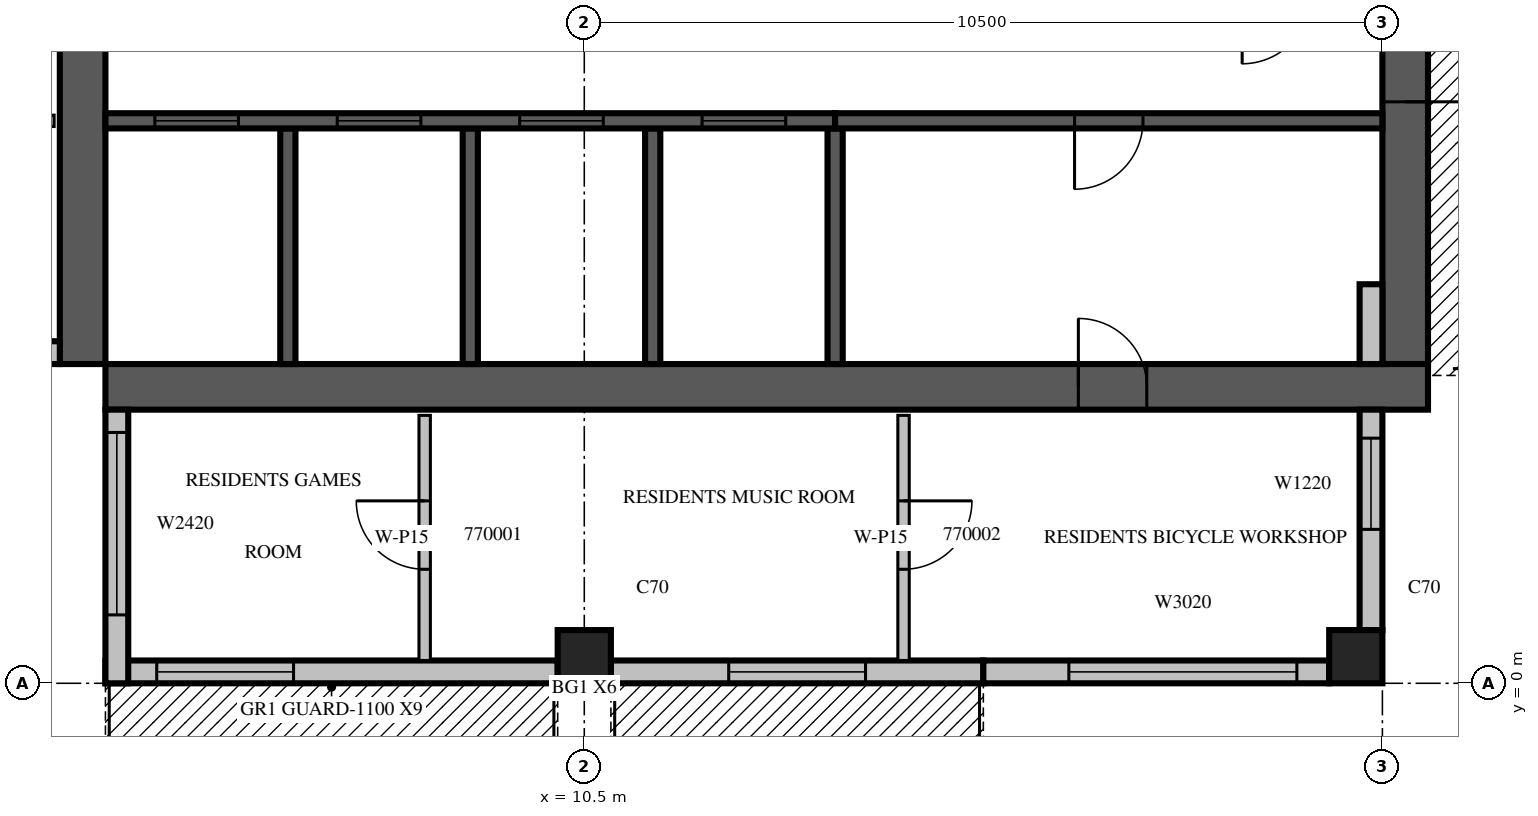
"""IFC4 building model, lengths in metres.
Left out: names, types, materials, properties, quantities, classifications, styles, units other than length and angle.
Written with IfcOpenShell. Run it as: python <this file> out.ifc"""

import sys

from ifc_helpers import new_model, si_unit, direction, frame, frame_2d, origin, origin_2d, place, context, subcontext, project, spatial, rectangle, extrude, source, transform, mapped, element, fill, save


model = new_model("IFC4")
c1 = context("Model", 3, precision=1e-05, world=origin(), true_north=direction((0.0, 1.0)))
c2 = subcontext(c1, "Body", "Model", "MODEL_VIEW")
j1 = project(units=[si_unit("LENGTHUNIT", "METRE"), si_unit("PLANEANGLEUNIT", "RADIAN")], contexts=[c1])
p1 = place(None, origin())
s1 = spatial("IfcSite", under=j1, at=p1, CompositionType="ELEMENT")
p2 = place(p1, origin())
s2 = spatial("IfcBuilding", under=s1, at=p2, CompositionType="ELEMENT")
p3 = place(p2, frame((0.0, 0.0, 305.5)))
s3 = spatial("IfcBuildingStorey", under=s2, at=p3, CompositionType="ELEMENT", Elevation=305.5)
m1 = source(origin(), c2, "Body", "SweptSolid", [
    extrude(rectangle(XDim=0.7, YDim=0.7, at=origin_2d()), origin(), (0.0, 0.0, 1.0), 3.5),
])
for number, where, z_axis, x_axis in (
    (1, (10.5, 0.35, 0.0), (0.0, 0.0, 1.0), (1.0, 0.0, 0.0)),
    (2, (20.65, 0.35, 0.0), (0.0, 0.0, 1.0), (1.0, 0.0, 0.0)),
):
    element("IfcColumn", number, at=place(p3, frame(where, z_axis=z_axis, x_axis=x_axis)), inside=s3, PredefinedType="COLUMN", context=c2, shape_type="MappedRepresentation", body=[
        mapped(m1, transform((0.0, 0.0, 0.0), scale=1.0)),
    ])
m2 = source(origin(), c2, "Body", "SweptSolid", [
    extrude(rectangle(XDim=17.4, YDim=0.6, at=frame_2d((8.7, 0.0))), origin(), (0.0, 0.0, 1.0), 3.5),
])
p4 = place(p3, frame((3.9, 4.2, 0.0), z_axis=(0.0, 0.0, 1.0), x_axis=(0.0, 1.0, 0.0)))
e3 = element("IfcWall", 3, at=p4, inside=s3, PredefinedType="SHEAR", context=c2, shape_type="MappedRepresentation", body=[
    mapped(m2, transform((0.0, 0.0, 0.0), scale=1.0)),
])
m3 = source(origin(), c2, "Body", "SweptSolid", [
    extrude(rectangle(XDim=2.2, YDim=2.1, at=frame_2d((1.1, 1.05))), frame((0.0, 0.31, 0.0), z_axis=(0.0, -1.0, 0.0), x_axis=(1.0, 0.0, 0.0)), (0.0, 0.0, 1.0), 0.62),
])
p5 = place(p4, frame((4.2, 0.0, 0.0)))
e4 = element("IfcOpeningElement", 4, at=p5, cuts=e3, PredefinedType="OPENING", context=c2, shape_type="MappedRepresentation", body=[
    mapped(m3, transform((0.0, 0.0, 0.0), scale=1.0)),
])
m4 = source(origin(), c2, "Body", "SweptSolid", [
    extrude(rectangle(XDim=0.9, YDim=2.1, at=frame_2d((0.45, 1.05))), frame((0.0, 0.31, 0.0), z_axis=(0.0, -1.0, 0.0), x_axis=(1.0, 0.0, 0.0)), (0.0, 0.0, 1.0), 0.62),
])
p6 = place(p4, frame((10.95, 0.0, 0.0)))
e5 = element("IfcOpeningElement", 5, at=p6, cuts=e3, PredefinedType="OPENING", context=c2, shape_type="MappedRepresentation", body=[
    mapped(m4, transform((0.0, 0.0, 0.0), scale=1.0)),
])
m5 = source(origin(), c2, "Body", "SweptSolid", [
    extrude(rectangle(XDim=6.3, YDim=0.6, at=frame_2d((3.15, 0.0))), origin(), (0.0, 0.0, 1.0), 3.5),
])
p7 = place(p3, frame((21.3, 4.2, 0.0), z_axis=(0.0, 0.0, 1.0), x_axis=(0.0, 1.0, 0.0)))
e6 = element("IfcWall", 6, at=p7, inside=s3, PredefinedType="SHEAR", context=c2, shape_type="MappedRepresentation", body=[
    mapped(m5, transform((0.0, 0.0, 0.0), scale=1.0)),
])
m6 = source(origin(), c2, "Body", "SweptSolid", [
    extrude(rectangle(XDim=1.2, YDim=2.1, at=frame_2d((0.6, 1.05))), frame((0.0, 0.31, 0.0), z_axis=(0.0, -1.0, 0.0), x_axis=(1.0, 0.0, 0.0)), (0.0, 0.0, 1.0), 0.62),
])
p8 = place(p7, frame((3.45, 0.0, 0.0)))
e7 = element("IfcOpeningElement", 7, at=p8, cuts=e6, PredefinedType="OPENING", context=c2, shape_type="MappedRepresentation", body=[
    mapped(m6, transform((0.0, 0.0, 0.0), scale=1.0)),
])
p9 = place(p3, frame((4.2, 3.9, 0.0), z_axis=(0.0, 0.0, 1.0), x_axis=(1.0, 0.0, 0.0)))
e8 = element("IfcWall", 8, at=p9, inside=s3, PredefinedType="SHEAR", context=c2, shape_type="MappedRepresentation", body=[
    mapped(m2, transform((0.0, 0.0, 0.0), scale=1.0)),
])
p10 = place(p9, frame((12.8, 0.0, 0.0)))
e9 = element("IfcOpeningElement", 9, at=p10, cuts=e8, PredefinedType="OPENING", context=c2, shape_type="MappedRepresentation", body=[
    mapped(m4, transform((0.0, 0.0, 0.0), scale=1.0)),
])
m7 = source(origin(), c2, "Body", "SweptSolid", [
    extrude(rectangle(XDim=5.95, YDim=0.3, at=frame_2d((2.975, 0.0))), origin(), (0.0, 0.0, 1.0), 3.1),
])
p11 = place(p3, frame((4.2, 0.15, 0.0), z_axis=(0.0, 0.0, 1.0), x_axis=(1.0, 0.0, 0.0)))
e10 = element("IfcWall", 10, at=p11, inside=s3, PredefinedType="STANDARD", context=c2, shape_type="MappedRepresentation", body=[
    mapped(m7, transform((0.0, 0.0, 0.0), scale=1.0)),
])
m8 = source(origin(), c2, "Body", "SweptSolid", [
    extrude(rectangle(XDim=1.8, YDim=2.4, at=frame_2d((0.9, 1.2))), frame((0.0, 0.16, 0.0), z_axis=(0.0, -1.0, 0.0), x_axis=(1.0, 0.0, 0.0)), (0.0, 0.0, 1.0), 0.32),
])
p12 = place(p11, frame((0.675, 0.0, 0.0)))
e11 = element("IfcOpeningElement", 11, at=p12, cuts=e10, PredefinedType="OPENING", context=c2, shape_type="MappedRepresentation", body=[
    mapped(m8, transform((0.0, 0.0, 0.0), scale=1.0)),
])
m9 = source(origin(), c2, "Body", "SweptSolid", [
    extrude(rectangle(XDim=4.9, YDim=0.3, at=frame_2d((2.45, 0.0))), origin(), (0.0, 0.0, 1.0), 3.1),
])
p13 = place(p3, frame((10.85, 0.15, 0.0), z_axis=(0.0, 0.0, 1.0), x_axis=(1.0, 0.0, 0.0)))
e12 = element("IfcWall", 12, at=p13, inside=s3, PredefinedType="STANDARD", context=c2, shape_type="MappedRepresentation", body=[
    mapped(m9, transform((0.0, 0.0, 0.0), scale=1.0)),
])
p14 = place(p13, frame((1.55, 0.0, 0.0)))
e13 = element("IfcOpeningElement", 13, at=p14, cuts=e12, PredefinedType="OPENING", context=c2, shape_type="MappedRepresentation", body=[
    mapped(m8, transform((0.0, 0.0, 0.0), scale=1.0)),
])
m10 = source(origin(), c2, "Body", "SweptSolid", [
    extrude(rectangle(XDim=4.55, YDim=0.3, at=frame_2d((2.275, 0.0))), origin(), (0.0, 0.0, 1.0), 3.1),
])
p15 = place(p3, frame((15.75, 0.15, 0.0), z_axis=(0.0, 0.0, 1.0), x_axis=(1.0, 0.0, 0.0)))
e14 = element("IfcWall", 14, at=p15, inside=s3, PredefinedType="STANDARD", context=c2, shape_type="MappedRepresentation", body=[
    mapped(m10, transform((0.0, 0.0, 0.0), scale=1.0)),
])
m11 = source(origin(), c2, "Body", "SweptSolid", [
    extrude(rectangle(XDim=3.0, YDim=2.0, at=frame_2d((1.5, 1.0))), frame((0.0, 0.16, 0.0), z_axis=(0.0, -1.0, 0.0), x_axis=(1.0, 0.0, 0.0)), (0.0, 0.0, 1.0), 0.32),
])
p16 = place(p15, frame((1.125, 0.0, 0.6)))
e15 = element("IfcOpeningElement", 15, at=p16, cuts=e14, PredefinedType="OPENING", context=c2, shape_type="MappedRepresentation", body=[
    mapped(m11, transform((0.0, 0.0, 0.0), scale=1.0)),
])
m12 = source(origin(), c2, "Body", "SweptSolid", [
    extrude(rectangle(XDim=2.9, YDim=0.3, at=frame_2d((1.45, 0.0))), origin(), (0.0, 0.0, 1.0), 3.1),
])
p17 = place(p3, frame((20.85, 0.7, 0.0), z_axis=(0.0, 0.0, 1.0), x_axis=(0.0, 1.0, 0.0)))
e16 = element("IfcWall", 16, at=p17, inside=s3, PredefinedType="STANDARD", context=c2, shape_type="MappedRepresentation", body=[
    mapped(m12, transform((0.0, 0.0, 0.0), scale=1.0)),
])
m13 = source(origin(), c2, "Body", "SweptSolid", [
    extrude(rectangle(XDim=1.2, YDim=2.0, at=frame_2d((0.6, 1.0))), frame((0.0, 0.16, 0.0), z_axis=(0.0, -1.0, 0.0), x_axis=(1.0, 0.0, 0.0)), (0.0, 0.0, 1.0), 0.32),
])
p18 = place(p17, frame((1.325, 0.0, 0.6)))
e17 = element("IfcOpeningElement", 17, at=p18, cuts=e16, PredefinedType="OPENING", context=c2, shape_type="MappedRepresentation", body=[
    mapped(m13, transform((0.0, 0.0, 0.0), scale=1.0)),
])
m14 = source(origin(), c2, "Body", "SweptSolid", [
    extrude(rectangle(XDim=1.05, YDim=0.3, at=frame_2d((0.525, 0.0))), origin(), (0.0, 0.0, 1.0), 3.1),
])
p19 = place(p3, frame((20.85, 4.2, 0.0), z_axis=(0.0, 0.0, 1.0), x_axis=(0.0, 1.0, 0.0)))
e18 = element("IfcWall", 18, at=p19, inside=s3, PredefinedType="STANDARD", context=c2, shape_type="MappedRepresentation", body=[
    mapped(m14, transform((0.0, 0.0, 0.0), scale=1.0)),
])
m15 = source(origin(), c2, "Body", "SweptSolid", [
    extrude(rectangle(XDim=3.6, YDim=0.3, at=frame_2d((1.8, 0.0))), origin(), (0.0, 0.0, 1.0), 3.1),
])
p20 = place(p3, frame((0.0, 4.35, 0.0), z_axis=(0.0, 0.0, 1.0), x_axis=(1.0, 0.0, 0.0)))
e19 = element("IfcWall", 19, at=p20, inside=s3, PredefinedType="STANDARD", context=c2, shape_type="MappedRepresentation", body=[
    mapped(m15, transform((0.0, 0.0, 0.0), scale=1.0)),
])
m16 = source(origin(), c2, "Body", "SweptSolid", [
    extrude(rectangle(XDim=2.4, YDim=2.0, at=frame_2d((1.2, 1.0))), frame((0.0, 0.16, 0.0), z_axis=(0.0, -1.0, 0.0), x_axis=(1.0, 0.0, 0.0)), (0.0, 0.0, 1.0), 0.32),
])
p21 = place(p20, frame((0.9, 0.0, 0.6)))
e20 = element("IfcOpeningElement", 20, at=p21, cuts=e19, PredefinedType="OPENING", context=c2, shape_type="MappedRepresentation", body=[
    mapped(m16, transform((0.0, 0.0, 0.0), scale=1.0)),
])
p22 = place(p3, frame((4.35, 3.6, 0.0), z_axis=(0.0, 0.0, 1.0), x_axis=(0.0, -1.0, 0.0)))
e21 = element("IfcWall", 21, at=p22, inside=s3, PredefinedType="STANDARD", context=c2, shape_type="MappedRepresentation", body=[
    mapped(m15, transform((0.0, 0.0, 0.0), scale=1.0)),
])
p23 = place(p22, frame((0.3, 0.0, 0.6)))
e22 = element("IfcOpeningElement", 22, at=p23, cuts=e21, PredefinedType="OPENING", context=c2, shape_type="MappedRepresentation", body=[
    mapped(m16, transform((0.0, 0.0, 0.0), scale=1.0)),
])
m17 = source(origin(), c2, "Body", "SweptSolid", [
    extrude(rectangle(XDim=3.1, YDim=0.2, at=frame_2d((1.55, 0.0))), origin(), (0.0, 0.0, 1.0), 3.5),
])
for number, where, z_axis, x_axis in (
    (23, (6.6, 4.2, 0.0), (0.0, 0.0, 1.0), (0.0, 1.0, 0.0)),
    (24, (9.0, 4.2, 0.0), (0.0, 0.0, 1.0), (0.0, 1.0, 0.0)),
    (25, (11.4, 4.2, 0.0), (0.0, 0.0, 1.0), (0.0, 1.0, 0.0)),
):
    element("IfcWall", number, at=place(p3, frame(where, z_axis=z_axis, x_axis=x_axis)), inside=s3, PredefinedType="SOLIDWALL", context=c2, shape_type="MappedRepresentation", body=[
        mapped(m17, transform((0.0, 0.0, 0.0), scale=1.0)),
    ])
m18 = source(origin(), c2, "Body", "SweptSolid", [
    extrude(rectangle(XDim=3.1, YDim=0.2, at=frame_2d((1.55, 0.0))), origin(), (0.0, 0.0, 1.0), 3.1),
])
p24 = place(p3, frame((13.8, 4.2, 0.0), z_axis=(0.0, 0.0, 1.0), x_axis=(0.0, 1.0, 0.0)))
e26 = element("IfcWall", 26, at=p24, inside=s3, PredefinedType="SOLIDWALL", context=c2, shape_type="MappedRepresentation", body=[
    mapped(m18, transform((0.0, 0.0, 0.0), scale=1.0)),
])
m19 = source(origin(), c2, "Body", "SweptSolid", [
    extrude(rectangle(XDim=9.6, YDim=0.2, at=frame_2d((4.8, 0.0))), origin(), (0.0, 0.0, 1.0), 3.5),
])
p25 = place(p3, frame((4.2, 7.4, 0.0), z_axis=(0.0, 0.0, 1.0), x_axis=(1.0, 0.0, 0.0)))
e27 = element("IfcWall", 27, at=p25, inside=s3, PredefinedType="SOLIDWALL", context=c2, shape_type="MappedRepresentation", body=[
    mapped(m19, transform((0.0, 0.0, 0.0), scale=1.0)),
])
m20 = source(origin(), c2, "Body", "SweptSolid", [
    extrude(rectangle(XDim=1.1, YDim=2.1, at=frame_2d((0.55, 1.05))), frame((0.0, 0.11, 0.0), z_axis=(0.0, -1.0, 0.0), x_axis=(1.0, 0.0, 0.0)), (0.0, 0.0, 1.0), 0.22),
])
p26 = place(p25, frame((0.65, 0.0, 0.0)))
e28 = element("IfcOpeningElement", 28, at=p26, cuts=e27, PredefinedType="OPENING", context=c2, shape_type="MappedRepresentation", body=[
    mapped(m20, transform((0.0, 0.0, 0.0), scale=1.0)),
])
p27 = place(p25, frame((3.05, 0.0, 0.0)))
e29 = element("IfcOpeningElement", 29, at=p27, cuts=e27, PredefinedType="OPENING", context=c2, shape_type="MappedRepresentation", body=[
    mapped(m20, transform((0.0, 0.0, 0.0), scale=1.0)),
])
p28 = place(p25, frame((5.45, 0.0, 0.0)))
e30 = element("IfcOpeningElement", 30, at=p28, cuts=e27, PredefinedType="OPENING", context=c2, shape_type="MappedRepresentation", body=[
    mapped(m20, transform((0.0, 0.0, 0.0), scale=1.0)),
])
p29 = place(p25, frame((7.85, 0.0, 0.0)))
e31 = element("IfcOpeningElement", 31, at=p29, cuts=e27, PredefinedType="OPENING", context=c2, shape_type="MappedRepresentation", body=[
    mapped(m20, transform((0.0, 0.0, 0.0), scale=1.0)),
])
m21 = source(origin(), c2, "Body", "SweptSolid", [
    extrude(rectangle(XDim=7.2, YDim=0.2, at=frame_2d((3.6, 0.0))), origin(), (0.0, 0.0, 1.0), 3.1),
])
p30 = place(p3, frame((13.8, 7.4, 0.0), z_axis=(0.0, 0.0, 1.0), x_axis=(1.0, 0.0, 0.0)))
e32 = element("IfcWall", 32, at=p30, inside=s3, PredefinedType="SOLIDWALL", context=c2, shape_type="MappedRepresentation", body=[
    mapped(m21, transform((0.0, 0.0, 0.0), scale=1.0)),
])
m22 = source(origin(), c2, "Body", "SweptSolid", [
    extrude(rectangle(XDim=0.9, YDim=2.1, at=frame_2d((0.45, 1.05))), frame((0.0, 0.11, 0.0), z_axis=(0.0, -1.0, 0.0), x_axis=(1.0, 0.0, 0.0)), (0.0, 0.0, 1.0), 0.22),
])
p31 = place(p30, frame((3.15, 0.0, 0.0)))
e33 = element("IfcOpeningElement", 33, at=p31, cuts=e32, PredefinedType="OPENING", context=c2, shape_type="MappedRepresentation", body=[
    mapped(m22, transform((0.0, 0.0, 0.0), scale=1.0)),
])
m23 = source(origin(), c2, "Body", "SweptSolid", [
    extrude(rectangle(XDim=3.225, YDim=0.15, at=frame_2d((1.613, 0.0))), origin(), (0.0, 0.0, 1.0), 3.1),
])
p32 = place(p3, frame((8.4, 3.525, 0.0), z_axis=(0.0, 0.0, 1.0), x_axis=(0.0, -1.0, 0.0)))
e34 = element("IfcWall", 34, at=p32, inside=s3, PredefinedType="PARTITIONING", context=c2, shape_type="MappedRepresentation", body=[
    mapped(m23, transform((0.0, 0.0, 0.0), scale=1.0)),
])
m24 = source(origin(), c2, "Body", "SweptSolid", [
    extrude(rectangle(XDim=0.9, YDim=2.1, at=frame_2d((0.45, 1.05))), frame((0.0, 0.085, 0.0), z_axis=(0.0, -1.0, 0.0), x_axis=(1.0, 0.0, 0.0)), (0.0, 0.0, 1.0), 0.17),
])
p33 = place(p32, frame((1.125, 0.0, 0.0)))
e35 = element("IfcOpeningElement", 35, at=p33, cuts=e34, PredefinedType="OPENING", context=c2, shape_type="MappedRepresentation", body=[
    mapped(m24, transform((0.0, 0.0, 0.0), scale=1.0)),
])
p34 = place(p3, frame((14.7, 3.525, 0.0), z_axis=(0.0, 0.0, 1.0), x_axis=(0.0, -1.0, 0.0)))
e36 = element("IfcWall", 36, at=p34, inside=s3, PredefinedType="PARTITIONING", context=c2, shape_type="MappedRepresentation", body=[
    mapped(m23, transform((0.0, 0.0, 0.0), scale=1.0)),
])
p35 = place(p34, frame((1.125, 0.0, 0.0)))
e37 = element("IfcOpeningElement", 37, at=p35, cuts=e36, PredefinedType="OPENING", context=c2, shape_type="MappedRepresentation", body=[
    mapped(m24, transform((0.0, 0.0, 0.0), scale=1.0)),
])
p36 = place(p3, frame((0.3, 7.4, 0.0), z_axis=(0.0, 0.0, 1.0), x_axis=(1.0, 0.0, 0.0)))
e38 = element("IfcWall", 38, at=p36, inside=s3, PredefinedType="PARTITIONING", context=c2, shape_type="MappedRepresentation", body=[
    mapped(m23, transform((0.0, 0.0, 0.0), scale=1.0)),
])
p37 = place(p36, frame((1.2, 0.0, 0.0)))
e39 = element("IfcOpeningElement", 39, at=p37, cuts=e38, PredefinedType="OPENING", context=c2, shape_type="MappedRepresentation", body=[
    mapped(m24, transform((0.0, 0.0, 0.0), scale=1.0)),
])
m25 = source(origin(), c2, "Body", "SweptSolid", [
    extrude(rectangle(XDim=1.8, YDim=2.4, at=frame_2d((0.9, 1.2))), frame((0.0, 0.025, 0.0), z_axis=(0.0, -1.0, 0.0), x_axis=(1.0, 0.0, 0.0)), (0.0, 0.0, 1.0), 0.05),
])
p38 = place(p12, origin())
e40 = element("IfcDoor", 40, at=p38, inside=s3, OperationType="SLIDING_TO_LEFT", PredefinedType="DOOR", context=c2, shape_type="MappedRepresentation", body=[
    mapped(m25, transform((0.0, 0.0, 0.0), scale=1.0)),
])
fill(e11, e40)
p39 = place(p14, origin())
e41 = element("IfcDoor", 41, at=p39, inside=s3, OperationType="SLIDING_TO_LEFT", PredefinedType="DOOR", context=c2, shape_type="MappedRepresentation", body=[
    mapped(m25, transform((0.0, 0.0, 0.0), scale=1.0)),
])
fill(e13, e41)
m26 = source(origin(), c2, "Body", "SweptSolid", [
    extrude(rectangle(XDim=3.0, YDim=2.0, at=frame_2d((1.5, 1.0))), frame((0.0, 0.03, 0.0), z_axis=(0.0, -1.0, 0.0), x_axis=(1.0, 0.0, 0.0)), (0.0, 0.0, 1.0), 0.06),
])
p40 = place(p16, origin())
e42 = element("IfcWindow", 42, at=p40, inside=s3, PartitioningType="SINGLE_PANEL", PredefinedType="WINDOW", context=c2, shape_type="MappedRepresentation", body=[
    mapped(m26, transform((0.0, 0.0, 0.0), scale=1.0)),
])
fill(e15, e42)
m27 = source(origin(), c2, "Body", "SweptSolid", [
    extrude(rectangle(XDim=1.2, YDim=2.0, at=frame_2d((0.6, 1.0))), frame((0.0, 0.03, 0.0), z_axis=(0.0, -1.0, 0.0), x_axis=(1.0, 0.0, 0.0)), (0.0, 0.0, 1.0), 0.06),
])
p41 = place(p18, origin())
e43 = element("IfcWindow", 43, at=p41, inside=s3, PartitioningType="SINGLE_PANEL", PredefinedType="WINDOW", context=c2, shape_type="MappedRepresentation", body=[
    mapped(m27, transform((0.0, 0.0, 0.0), scale=1.0)),
])
fill(e17, e43)
m28 = source(origin(), c2, "Body", "SweptSolid", [
    extrude(rectangle(XDim=2.4, YDim=2.0, at=frame_2d((1.2, 1.0))), frame((0.0, 0.03, 0.0), z_axis=(0.0, -1.0, 0.0), x_axis=(1.0, 0.0, 0.0)), (0.0, 0.0, 1.0), 0.06),
])
p42 = place(p23, origin())
e44 = element("IfcWindow", 44, at=p42, inside=s3, PartitioningType="SINGLE_PANEL", PredefinedType="WINDOW", context=c2, shape_type="MappedRepresentation", body=[
    mapped(m28, transform((0.0, 0.0, 0.0), scale=1.0)),
])
fill(e22, e44)
m29 = source(origin(), c2, "Body", "SweptSolid", [
    extrude(rectangle(XDim=1.1, YDim=2.1, at=frame_2d((0.55, 1.05))), frame((0.0, 0.025, 0.0), z_axis=(0.0, -1.0, 0.0), x_axis=(1.0, 0.0, 0.0)), (0.0, 0.0, 1.0), 0.05),
])
p43 = place(p26, origin())
e45 = element("IfcDoor", 45, at=p43, inside=s3, OperationType="SLIDING_TO_LEFT", PredefinedType="DOOR", context=c2, shape_type="MappedRepresentation", body=[
    mapped(m29, transform((0.0, 0.0, 0.0), scale=1.0)),
])
fill(e28, e45)
p44 = place(p27, origin())
e46 = element("IfcDoor", 46, at=p44, inside=s3, OperationType="SLIDING_TO_LEFT", PredefinedType="DOOR", context=c2, shape_type="MappedRepresentation", body=[
    mapped(m29, transform((0.0, 0.0, 0.0), scale=1.0)),
])
fill(e29, e46)
p45 = place(p28, origin())
e47 = element("IfcDoor", 47, at=p45, inside=s3, OperationType="SLIDING_TO_LEFT", PredefinedType="DOOR", context=c2, shape_type="MappedRepresentation", body=[
    mapped(m29, transform((0.0, 0.0, 0.0), scale=1.0)),
])
fill(e30, e47)
p46 = place(p29, origin())
e48 = element("IfcDoor", 48, at=p46, inside=s3, OperationType="SLIDING_TO_LEFT", PredefinedType="DOOR", context=c2, shape_type="MappedRepresentation", body=[
    mapped(m29, transform((0.0, 0.0, 0.0), scale=1.0)),
])
fill(e31, e48)
m30 = source(origin(), c2, "Body", "SweptSolid", [
    extrude(rectangle(XDim=0.9, YDim=2.1, at=frame_2d((0.45, 1.05))), frame((0.0, 0.025, 0.0), z_axis=(0.0, -1.0, 0.0), x_axis=(1.0, 0.0, 0.0)), (0.0, 0.0, 1.0), 0.05),
])
p47 = place(p31, origin())
e49 = element("IfcDoor", 49, at=p47, inside=s3, OperationType="SINGLE_SWING_RIGHT", PredefinedType="DOOR", context=c2, shape_type="MappedRepresentation", body=[
    mapped(m30, transform((0.0, 0.0, 0.0), scale=1.0)),
])
fill(e33, e49)
m31 = source(origin(), c2, "Body", "SweptSolid", [
    extrude(rectangle(XDim=1.2, YDim=2.1, at=frame_2d((0.6, 1.05))), frame((0.0, 0.025, 0.0), z_axis=(0.0, -1.0, 0.0), x_axis=(1.0, 0.0, 0.0)), (0.0, 0.0, 1.0), 0.05),
])
p48 = place(p8, origin())
e50 = element("IfcDoor", 50, at=p48, inside=s3, OperationType="SINGLE_SWING_RIGHT", PredefinedType="DOOR", context=c2, shape_type="MappedRepresentation", body=[
    mapped(m31, transform((0.0, 0.0, 0.0), scale=1.0)),
])
fill(e7, e50)
p49 = place(p10, origin())
e51 = element("IfcDoor", 51, at=p49, inside=s3, OperationType="SINGLE_SWING_LEFT", PredefinedType="DOOR", context=c2, shape_type="MappedRepresentation", body=[
    mapped(m30, transform((0.0, 0.0, 0.0), scale=1.0)),
])
fill(e9, e51)
p50 = place(p33, origin())
e52 = element("IfcDoor", 52, at=p50, inside=s3, OperationType="SINGLE_SWING_RIGHT", PredefinedType="DOOR", context=c2, shape_type="MappedRepresentation", body=[
    mapped(m30, transform((0.0, 0.0, 0.0), scale=1.0)),
])
fill(e35, e52)
p51 = place(p35, origin())
e53 = element("IfcDoor", 53, at=p51, inside=s3, OperationType="SINGLE_SWING_LEFT", PredefinedType="DOOR", context=c2, shape_type="MappedRepresentation", body=[
    mapped(m30, transform((0.0, 0.0, 0.0), scale=1.0)),
])
fill(e37, e53)
save(model, sys.argv[1])
